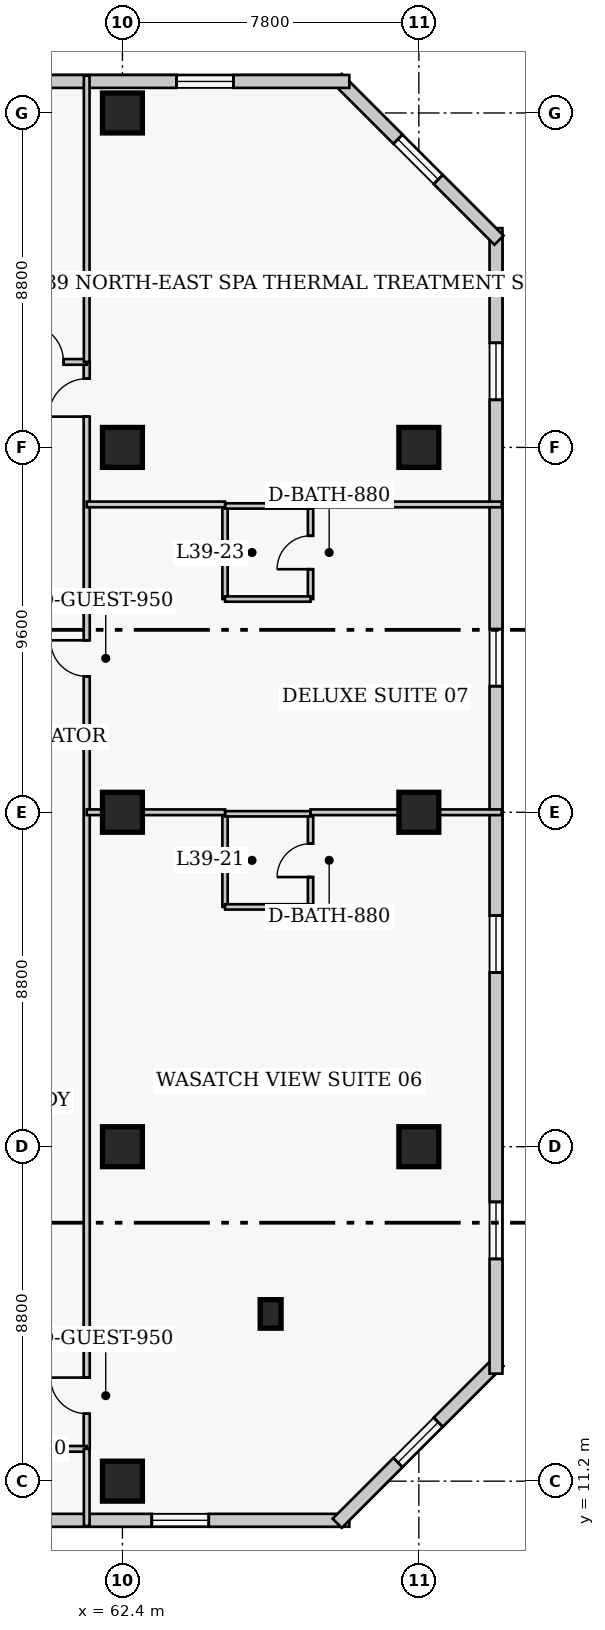
"""IFC4 building model, lengths in metres.
Left out: names, types, materials, properties, quantities, classifications, styles, units other than length and angle.
Written with IfcOpenShell. Run it as: python <this file> out.ifc"""

import sys

from ifc_helpers import new_model, si_unit, direction, frame, frame_2d, origin, origin_2d, place, context, subcontext, project, spatial, rectangle, extrude, element, fill, save


model = new_model("IFC4")
c1 = context("Model", 3, precision=1e-05, world=origin(), true_north=direction((0.0, 1.0)))
c2 = subcontext(c1, "Body", "Model", "MODEL_VIEW")
j1 = project(units=[si_unit("LENGTHUNIT", "METRE"), si_unit("PLANEANGLEUNIT", "RADIAN")], contexts=[c1])
p1 = place(None, origin())
s1 = spatial("IfcSite", under=j1, at=p1, CompositionType="ELEMENT")
p2 = place(p1, origin())
s2 = spatial("IfcBuilding", under=s1, at=p2, CompositionType="ELEMENT")
p3 = place(p2, frame((0.0, 0.0, 157.4)))
s3 = spatial("IfcBuildingStorey", under=s2, at=p3, CompositionType="ELEMENT", Elevation=157.4)
for number, where, z_axis, x_axis in (
    (1, (62.4, 11.2, 0.0), (0.0, 0.0, 1.0), (1.0, 0.0, 0.0)),
    (2, (62.4, 20.0, 0.0), (0.0, 0.0, 1.0), (1.0, 0.0, 0.0)),
    (3, (62.4, 28.8, 0.0), (0.0, 0.0, 1.0), (1.0, 0.0, 0.0)),
    (4, (62.4, 38.4, 0.0), (0.0, 0.0, 1.0), (1.0, 0.0, 0.0)),
    (5, (62.4, 47.2, 0.0), (0.0, 0.0, 1.0), (1.0, 0.0, 0.0)),
    (6, (70.2, 20.0, 0.0), (0.0, 0.0, 1.0), (1.0, 0.0, 0.0)),
    (7, (70.2, 28.8, 0.0), (0.0, 0.0, 1.0), (1.0, 0.0, 0.0)),
    (8, (70.2, 38.4, 0.0), (0.0, 0.0, 1.0), (1.0, 0.0, 0.0)),
):
    element("IfcColumn", number, at=place(p3, frame(where, z_axis=z_axis, x_axis=x_axis)), inside=s3, PredefinedType="COLUMN", context=c2, shape_type="SweptSolid", body=[
        extrude(rectangle(XDim=1.05, YDim=1.05, at=origin_2d()), origin(), (0.0, 0.0, 1.0), 3.8),
    ])
p4 = place(p3, frame((66.3, 15.6, 0.0), z_axis=(0.0, 0.0, 1.0), x_axis=(1.0, 0.0, 0.0)))
e9 = element("IfcColumn", 9, at=p4, inside=s3, PredefinedType="PILASTER", context=c2, shape_type="SweptSolid", body=[
    extrude(rectangle(XDim=0.55, YDim=0.75, at=origin_2d()), origin(), (0.0, 0.0, 1.0), 3.8),
])
p5 = place(p3, frame((41.68, 10.17, 0.0), z_axis=(0.0, 0.0, 1.0), x_axis=(1.0, 0.0, 0.0)))
e10 = element("IfcWall", 10, at=p5, inside=s3, PredefinedType="SOLIDWALL", context=c2, shape_type="SweptSolid", body=[
    extrude(rectangle(XDim=26.69, YDim=0.34, at=frame_2d((13.345, 0.0))), origin(), (0.0, 0.0, 1.0), 3.55),
])
p6 = place(p5, frame((8.32, 0.0, 0.0)))
e11 = element("IfcOpeningElement", 11, at=p6, cuts=e10, PredefinedType="OPENING", context=c2, shape_type="SweptSolid", body=[
    extrude(rectangle(XDim=1.4, YDim=2.15, at=frame_2d((0.7, 1.075))), frame((0.0, 0.18, 0.0), z_axis=(0.0, -1.0, 0.0), x_axis=(1.0, 0.0, 0.0)), (0.0, 0.0, 1.0), 0.36),
])
p7 = place(p5, frame((2.548, 0.0, 0.85)))
e12 = element("IfcOpeningElement", 12, at=p7, cuts=e10, PredefinedType="OPENING", context=c2, shape_type="SweptSolid", body=[
    extrude(rectangle(XDim=1.5, YDim=1.75, at=frame_2d((0.75, 0.875))), frame((0.0, 0.18, 0.0), z_axis=(0.0, -1.0, 0.0), x_axis=(1.0, 0.0, 0.0)), (0.0, 0.0, 1.0), 0.36),
])
p8 = place(p5, frame((13.745, 0.0, 0.85)))
e13 = element("IfcOpeningElement", 13, at=p8, cuts=e10, PredefinedType="OPENING", context=c2, shape_type="SweptSolid", body=[
    extrude(rectangle(XDim=1.5, YDim=1.75, at=frame_2d((0.75, 0.875))), frame((0.0, 0.18, 0.0), z_axis=(0.0, -1.0, 0.0), x_axis=(1.0, 0.0, 0.0)), (0.0, 0.0, 1.0), 0.36),
])
p9 = place(p5, frame((21.492, 0.0, 0.85)))
e14 = element("IfcOpeningElement", 14, at=p9, cuts=e10, PredefinedType="OPENING", context=c2, shape_type="SweptSolid", body=[
    extrude(rectangle(XDim=1.5, YDim=1.75, at=frame_2d((0.75, 0.875))), frame((0.0, 0.18, 0.0), z_axis=(0.0, -1.0, 0.0), x_axis=(1.0, 0.0, 0.0)), (0.0, 0.0, 1.0), 0.36),
])
p10 = place(p3, frame((68.052, 10.092, 0.0), z_axis=(0.0, 0.0, 1.0), x_axis=(0.707106781187, 0.707106781187, 0.0)))
e15 = element("IfcWall", 15, at=p10, inside=s3, PredefinedType="SOLIDWALL", context=c2, shape_type="SweptSolid", body=[
    extrude(rectangle(XDim=6.02, YDim=0.34, at=frame_2d((3.01, 0.0))), origin(), (0.0, 0.0, 1.0), 3.55),
])
p11 = place(p10, frame((2.26, 0.0, 0.85)))
e16 = element("IfcOpeningElement", 16, at=p11, cuts=e15, PredefinedType="OPENING", context=c2, shape_type="SweptSolid", body=[
    extrude(rectangle(XDim=1.5, YDim=1.75, at=frame_2d((0.75, 0.875))), frame((0.0, 0.18, 0.0), z_axis=(0.0, -1.0, 0.0), x_axis=(1.0, 0.0, 0.0)), (0.0, 0.0, 1.0), 0.36),
])
p12 = place(p3, frame((72.23, 14.03, 0.0), z_axis=(0.0, 0.0, 1.0), x_axis=(0.0, 1.0, 0.0)))
e17 = element("IfcWall", 17, at=p12, inside=s3, PredefinedType="SOLIDWALL", context=c2, shape_type="SweptSolid", body=[
    extrude(rectangle(XDim=30.14, YDim=0.34, at=frame_2d((15.07, 0.0))), origin(), (0.0, 0.0, 1.0), 3.55),
])
p13 = place(p12, frame((3.018, 0.0, 0.85)))
e18 = element("IfcOpeningElement", 18, at=p13, cuts=e17, PredefinedType="OPENING", context=c2, shape_type="SweptSolid", body=[
    extrude(rectangle(XDim=1.5, YDim=1.75, at=frame_2d((0.75, 0.875))), frame((0.0, 0.18, 0.0), z_axis=(0.0, -1.0, 0.0), x_axis=(1.0, 0.0, 0.0)), (0.0, 0.0, 1.0), 0.36),
])
p14 = place(p12, frame((10.552, 0.0, 0.85)))
e19 = element("IfcOpeningElement", 19, at=p14, cuts=e17, PredefinedType="OPENING", context=c2, shape_type="SweptSolid", body=[
    extrude(rectangle(XDim=1.5, YDim=1.75, at=frame_2d((0.75, 0.875))), frame((0.0, 0.18, 0.0), z_axis=(0.0, -1.0, 0.0), x_axis=(1.0, 0.0, 0.0)), (0.0, 0.0, 1.0), 0.36),
])
p15 = place(p12, frame((18.087, 0.0, 0.85)))
e20 = element("IfcOpeningElement", 20, at=p15, cuts=e17, PredefinedType="OPENING", context=c2, shape_type="SweptSolid", body=[
    extrude(rectangle(XDim=1.5, YDim=1.75, at=frame_2d((0.75, 0.875))), frame((0.0, 0.18, 0.0), z_axis=(0.0, -1.0, 0.0), x_axis=(1.0, 0.0, 0.0)), (0.0, 0.0, 1.0), 0.36),
])
p16 = place(p12, frame((25.623, 0.0, 0.85)))
e21 = element("IfcOpeningElement", 21, at=p16, cuts=e17, PredefinedType="OPENING", context=c2, shape_type="SweptSolid", body=[
    extrude(rectangle(XDim=1.5, YDim=1.75, at=frame_2d((0.75, 0.875))), frame((0.0, 0.18, 0.0), z_axis=(0.0, -1.0, 0.0), x_axis=(1.0, 0.0, 0.0)), (0.0, 0.0, 1.0), 0.36),
])
p17 = place(p3, frame((72.308, 43.852, 0.0), z_axis=(0.0, 0.0, 1.0), x_axis=(-0.707106781187, 0.707106781187, 0.0)))
e22 = element("IfcWall", 22, at=p17, inside=s3, PredefinedType="SOLIDWALL", context=c2, shape_type="SweptSolid", body=[
    extrude(rectangle(XDim=6.02, YDim=0.34, at=frame_2d((3.01, 0.0))), origin(), (0.0, 0.0, 1.0), 3.55),
])
p18 = place(p17, frame((2.26, 0.0, 0.85)))
e23 = element("IfcOpeningElement", 23, at=p18, cuts=e22, PredefinedType="OPENING", context=c2, shape_type="SweptSolid", body=[
    extrude(rectangle(XDim=1.5, YDim=1.75, at=frame_2d((0.75, 0.875))), frame((0.0, 0.18, 0.0), z_axis=(0.0, -1.0, 0.0), x_axis=(1.0, 0.0, 0.0)), (0.0, 0.0, 1.0), 0.36),
])
p19 = place(p3, frame((68.37, 48.03, 0.0), z_axis=(0.0, 0.0, 1.0), x_axis=(-1.0, 0.0, 0.0)))
e24 = element("IfcWall", 24, at=p19, inside=s3, PredefinedType="SOLIDWALL", context=c2, shape_type="SweptSolid", body=[
    extrude(rectangle(XDim=26.69, YDim=0.34, at=frame_2d((13.345, 0.0))), origin(), (0.0, 0.0, 1.0), 3.55),
])
p20 = place(p19, frame((3.048, 0.0, 0.85)))
e25 = element("IfcOpeningElement", 25, at=p20, cuts=e24, PredefinedType="OPENING", context=c2, shape_type="SweptSolid", body=[
    extrude(rectangle(XDim=1.5, YDim=1.75, at=frame_2d((0.75, 0.875))), frame((0.0, 0.18, 0.0), z_axis=(0.0, -1.0, 0.0), x_axis=(1.0, 0.0, 0.0)), (0.0, 0.0, 1.0), 0.36),
])
p21 = place(p19, frame((11.445, 0.0, 0.85)))
e26 = element("IfcOpeningElement", 26, at=p21, cuts=e24, PredefinedType="OPENING", context=c2, shape_type="SweptSolid", body=[
    extrude(rectangle(XDim=1.5, YDim=1.75, at=frame_2d((0.75, 0.875))), frame((0.0, 0.18, 0.0), z_axis=(0.0, -1.0, 0.0), x_axis=(1.0, 0.0, 0.0)), (0.0, 0.0, 1.0), 0.36),
])
p22 = place(p19, frame((22.642, 0.0, 0.85)))
e27 = element("IfcOpeningElement", 27, at=p22, cuts=e24, PredefinedType="OPENING", context=c2, shape_type="SweptSolid", body=[
    extrude(rectangle(XDim=1.5, YDim=1.75, at=frame_2d((0.75, 0.875))), frame((0.0, 0.18, 0.0), z_axis=(0.0, -1.0, 0.0), x_axis=(1.0, 0.0, 0.0)), (0.0, 0.0, 1.0), 0.36),
])
p23 = place(p3, frame((61.46, 12.05, 0.0), z_axis=(0.0, 0.0, 1.0), x_axis=(0.0, 1.0, 0.0)))
e28 = element("IfcWall", 28, at=p23, inside=s3, PredefinedType="PARTITIONING", context=c2, shape_type="SweptSolid", body=[
    extrude(rectangle(XDim=28.6, YDim=0.16, at=frame_2d((14.3, 0.0))), origin(), (0.0, 0.0, 1.0), 3.55),
])
p24 = place(p23, frame((0.925, 0.0, 0.0)))
e29 = element("IfcOpeningElement", 29, at=p24, cuts=e28, PredefinedType="OPENING", context=c2, shape_type="SweptSolid", body=[
    extrude(rectangle(XDim=0.95, YDim=2.1, at=frame_2d((0.475, 1.05))), frame((0.0, 0.09, 0.0), z_axis=(0.0, -1.0, 0.0), x_axis=(1.0, 0.0, 0.0)), (0.0, 0.0, 1.0), 0.18),
])
p25 = place(p23, frame((20.325, 0.0, 0.0)))
e30 = element("IfcOpeningElement", 30, at=p25, cuts=e28, PredefinedType="OPENING", context=c2, shape_type="SweptSolid", body=[
    extrude(rectangle(XDim=0.95, YDim=2.1, at=frame_2d((0.475, 1.05))), frame((0.0, 0.09, 0.0), z_axis=(0.0, -1.0, 0.0), x_axis=(1.0, 0.0, 0.0)), (0.0, 0.0, 1.0), 0.18),
])
p26 = place(p23, frame((27.16, 0.0, 0.0)))
e31 = element("IfcOpeningElement", 31, at=p26, cuts=e28, PredefinedType="OPENING", context=c2, shape_type="SweptSolid", body=[
    extrude(rectangle(XDim=1.0, YDim=2.15, at=frame_2d((0.5, 1.075))), frame((0.0, 0.09, 0.0), z_axis=(0.0, -1.0, 0.0), x_axis=(1.0, 0.0, 0.0)), (0.0, 0.0, 1.0), 0.18),
])
p27 = place(p3, frame((59.24, 12.05, 0.0), z_axis=(0.0, 0.0, 1.0), x_axis=(1.0, 0.0, 0.0)))
e32 = element("IfcWall", 32, at=p27, inside=s3, PredefinedType="PARTITIONING", context=c2, shape_type="SweptSolid", body=[
    extrude(rectangle(XDim=2.22, YDim=0.15, at=frame_2d((1.11, 0.0))), origin(), (0.0, 0.0, 1.0), 3.55),
])
p28 = place(p3, frame((56.8, 40.65, 0.0), z_axis=(0.0, 0.0, 1.0), x_axis=(1.0, 0.0, 0.0)))
e33 = element("IfcWall", 33, at=p28, inside=s3, PredefinedType="PARTITIONING", context=c2, shape_type="SweptSolid", body=[
    extrude(rectangle(XDim=4.66, YDim=0.15, at=frame_2d((2.33, 0.0))), origin(), (0.0, 0.0, 1.0), 3.55),
])
p29 = place(p28, frame((3.05, 0.0, 0.0)))
e34 = element("IfcOpeningElement", 34, at=p29, cuts=e33, PredefinedType="OPENING", context=c2, shape_type="SweptSolid", body=[
    extrude(rectangle(XDim=1.0, YDim=2.15, at=frame_2d((0.5, 1.075))), frame((0.0, 0.085, 0.0), z_axis=(0.0, -1.0, 0.0), x_axis=(1.0, 0.0, 0.0)), (0.0, 0.0, 1.0), 0.17),
])
p30 = place(p3, frame((61.46, 40.65, 0.0), z_axis=(0.0, 0.0, 1.0), x_axis=(0.0, 1.0, 0.0)))
e35 = element("IfcWall", 35, at=p30, inside=s3, PredefinedType="PARTITIONING", context=c2, shape_type="SweptSolid", body=[
    extrude(rectangle(XDim=7.53, YDim=0.15, at=frame_2d((3.765, 0.0))), origin(), (0.0, 0.0, 1.0), 3.55),
])
p31 = place(p3, frame((61.46, 10.02, 0.0), z_axis=(0.0, 0.0, 1.0), x_axis=(0.0, 1.0, 0.0)))
e36 = element("IfcWall", 36, at=p31, inside=s3, PredefinedType="PARTITIONING", context=c2, shape_type="SweptSolid", body=[
    extrude(rectangle(XDim=2.03, YDim=0.15, at=frame_2d((1.015, 0.0))), origin(), (0.0, 0.0, 1.0), 3.55),
])
p32 = place(p3, frame((65.1, 26.31, 0.0), z_axis=(0.0, 0.0, 1.0), x_axis=(0.0, 1.0, 0.0)))
e37 = element("IfcWall", 37, at=p32, inside=s3, PredefinedType="PLUMBINGWALL", context=c2, shape_type="SweptSolid", body=[
    extrude(rectangle(XDim=2.45, YDim=0.14, at=frame_2d((1.225, 0.0))), origin(), (0.0, 0.0, 1.0), 3.55),
])
p33 = place(p3, frame((67.35, 26.31, 0.0), z_axis=(0.0, 0.0, 1.0), x_axis=(0.0, 1.0, 0.0)))
e38 = element("IfcWall", 38, at=p33, inside=s3, PredefinedType="PLUMBINGWALL", context=c2, shape_type="SweptSolid", body=[
    extrude(rectangle(XDim=2.45, YDim=0.14, at=frame_2d((1.225, 0.0))), origin(), (0.0, 0.0, 1.0), 3.55),
])
p34 = place(p33, frame((0.785, 0.0, 0.0)))
e39 = element("IfcOpeningElement", 39, at=p34, cuts=e38, PredefinedType="OPENING", context=c2, shape_type="SweptSolid", body=[
    extrude(rectangle(XDim=0.88, YDim=2.05, at=frame_2d((0.44, 1.025))), frame((0.0, 0.08, 0.0), z_axis=(0.0, -1.0, 0.0), x_axis=(1.0, 0.0, 0.0)), (0.0, 0.0, 1.0), 0.16),
])
p35 = place(p3, frame((65.1, 26.31, 0.0), z_axis=(0.0, 0.0, 1.0), x_axis=(1.0, 0.0, 0.0)))
e40 = element("IfcWall", 40, at=p35, inside=s3, PredefinedType="PLUMBINGWALL", context=c2, shape_type="SweptSolid", body=[
    extrude(rectangle(XDim=2.25, YDim=0.14, at=frame_2d((1.125, 0.0))), origin(), (0.0, 0.0, 1.0), 3.55),
])
p36 = place(p3, frame((65.1, 28.76, 0.0), z_axis=(0.0, 0.0, 1.0), x_axis=(1.0, 0.0, 0.0)))
e41 = element("IfcWall", 41, at=p36, inside=s3, PredefinedType="PLUMBINGWALL", context=c2, shape_type="SweptSolid", body=[
    extrude(rectangle(XDim=2.25, YDim=0.14, at=frame_2d((1.125, 0.0))), origin(), (0.0, 0.0, 1.0), 2.9),
])
p37 = place(p3, frame((61.46, 28.8, 0.0), z_axis=(0.0, 0.0, 1.0), x_axis=(1.0, 0.0, 0.0)))
e42 = element("IfcWall", 42, at=p37, inside=s3, PredefinedType="PARTITIONING", context=c2, shape_type="SweptSolid", body=[
    extrude(rectangle(XDim=3.64, YDim=0.15, at=frame_2d((1.82, 0.0))), origin(), (0.0, 0.0, 1.0), 2.778),
])
p38 = place(p3, frame((67.35, 28.8, 0.0), z_axis=(0.0, 0.0, 1.0), x_axis=(1.0, 0.0, 0.0)))
e43 = element("IfcWall", 43, at=p38, inside=s3, PredefinedType="PARTITIONING", context=c2, shape_type="SweptSolid", body=[
    extrude(rectangle(XDim=5.03, YDim=0.15, at=frame_2d((2.515, 0.0))), origin(), (0.0, 0.0, 1.0), 2.778),
])
p39 = place(p3, frame((65.1, 34.41, 0.0), z_axis=(0.0, 0.0, 1.0), x_axis=(0.0, 1.0, 0.0)))
e44 = element("IfcWall", 44, at=p39, inside=s3, PredefinedType="PLUMBINGWALL", context=c2, shape_type="SweptSolid", body=[
    extrude(rectangle(XDim=2.45, YDim=0.14, at=frame_2d((1.225, 0.0))), origin(), (0.0, 0.0, 1.0), 3.55),
])
p40 = place(p3, frame((67.35, 34.41, 0.0), z_axis=(0.0, 0.0, 1.0), x_axis=(0.0, 1.0, 0.0)))
e45 = element("IfcWall", 45, at=p40, inside=s3, PredefinedType="PLUMBINGWALL", context=c2, shape_type="SweptSolid", body=[
    extrude(rectangle(XDim=2.45, YDim=0.14, at=frame_2d((1.225, 0.0))), origin(), (0.0, 0.0, 1.0), 3.55),
])
p41 = place(p40, frame((0.785, 0.0, 0.0)))
e46 = element("IfcOpeningElement", 46, at=p41, cuts=e45, PredefinedType="OPENING", context=c2, shape_type="SweptSolid", body=[
    extrude(rectangle(XDim=0.88, YDim=2.05, at=frame_2d((0.44, 1.025))), frame((0.0, 0.08, 0.0), z_axis=(0.0, -1.0, 0.0), x_axis=(1.0, 0.0, 0.0)), (0.0, 0.0, 1.0), 0.16),
])
for number, where, z_axis, x_axis in (
    (47, (65.1, 34.41, 0.0), (0.0, 0.0, 1.0), (1.0, 0.0, 0.0)),
    (48, (65.1, 36.86, 0.0), (0.0, 0.0, 1.0), (1.0, 0.0, 0.0)),
):
    element("IfcWall", number, at=place(p3, frame(where, z_axis=z_axis, x_axis=x_axis)), inside=s3, PredefinedType="PLUMBINGWALL", context=c2, shape_type="SweptSolid", body=[
        extrude(rectangle(XDim=2.25, YDim=0.14, at=frame_2d((1.125, 0.0))), origin(), (0.0, 0.0, 1.0), 3.55),
    ])
p42 = place(p3, frame((61.46, 36.9, 0.0), z_axis=(0.0, 0.0, 1.0), x_axis=(1.0, 0.0, 0.0)))
e49 = element("IfcWall", 49, at=p42, inside=s3, PredefinedType="PARTITIONING", context=c2, shape_type="SweptSolid", body=[
    extrude(rectangle(XDim=3.64, YDim=0.15, at=frame_2d((1.82, 0.0))), origin(), (0.0, 0.0, 1.0), 3.55),
])
p43 = place(p3, frame((67.35, 36.9, 0.0), z_axis=(0.0, 0.0, 1.0), x_axis=(1.0, 0.0, 0.0)))
e50 = element("IfcWall", 50, at=p43, inside=s3, PredefinedType="PARTITIONING", context=c2, shape_type="SweptSolid", body=[
    extrude(rectangle(XDim=5.03, YDim=0.15, at=frame_2d((2.515, 0.0))), origin(), (0.0, 0.0, 1.0), 3.55),
])
p44 = place(p9, origin())
e51 = element("IfcWindow", 51, at=p44, inside=s3, PartitioningType="SINGLE_PANEL", PredefinedType="WINDOW", context=c2, shape_type="SweptSolid", body=[
    extrude(rectangle(XDim=1.5, YDim=1.75, at=frame_2d((0.75, 0.875))), frame((0.0, 0.03, 0.0), z_axis=(0.0, -1.0, 0.0), x_axis=(1.0, 0.0, 0.0)), (0.0, 0.0, 1.0), 0.06),
])
fill(e14, e51)
p45 = place(p11, origin())
e52 = element("IfcWindow", 52, at=p45, inside=s3, PartitioningType="SINGLE_PANEL", PredefinedType="WINDOW", context=c2, shape_type="SweptSolid", body=[
    extrude(rectangle(XDim=1.5, YDim=1.75, at=frame_2d((0.75, 0.875))), frame((0.0, 0.03, 0.0), z_axis=(0.0, -1.0, 0.0), x_axis=(1.0, 0.0, 0.0)), (0.0, 0.0, 1.0), 0.06),
])
fill(e16, e52)
p46 = place(p13, origin())
e53 = element("IfcWindow", 53, at=p46, inside=s3, PartitioningType="SINGLE_PANEL", PredefinedType="WINDOW", context=c2, shape_type="SweptSolid", body=[
    extrude(rectangle(XDim=1.5, YDim=1.75, at=frame_2d((0.75, 0.875))), frame((0.0, 0.03, 0.0), z_axis=(0.0, -1.0, 0.0), x_axis=(1.0, 0.0, 0.0)), (0.0, 0.0, 1.0), 0.06),
])
fill(e18, e53)
p47 = place(p14, origin())
e54 = element("IfcWindow", 54, at=p47, inside=s3, PartitioningType="SINGLE_PANEL", PredefinedType="WINDOW", context=c2, shape_type="SweptSolid", body=[
    extrude(rectangle(XDim=1.5, YDim=1.75, at=frame_2d((0.75, 0.875))), frame((0.0, 0.03, 0.0), z_axis=(0.0, -1.0, 0.0), x_axis=(1.0, 0.0, 0.0)), (0.0, 0.0, 1.0), 0.06),
])
fill(e19, e54)
p48 = place(p15, origin())
e55 = element("IfcWindow", 55, at=p48, inside=s3, PartitioningType="SINGLE_PANEL", PredefinedType="WINDOW", context=c2, shape_type="SweptSolid", body=[
    extrude(rectangle(XDim=1.5, YDim=1.75, at=frame_2d((0.75, 0.875))), frame((0.0, 0.03, 0.0), z_axis=(0.0, -1.0, 0.0), x_axis=(1.0, 0.0, 0.0)), (0.0, 0.0, 1.0), 0.06),
])
fill(e20, e55)
p49 = place(p16, origin())
e56 = element("IfcWindow", 56, at=p49, inside=s3, PartitioningType="SINGLE_PANEL", PredefinedType="WINDOW", context=c2, shape_type="SweptSolid", body=[
    extrude(rectangle(XDim=1.5, YDim=1.75, at=frame_2d((0.75, 0.875))), frame((0.0, 0.03, 0.0), z_axis=(0.0, -1.0, 0.0), x_axis=(1.0, 0.0, 0.0)), (0.0, 0.0, 1.0), 0.06),
])
fill(e21, e56)
p50 = place(p18, origin())
e57 = element("IfcWindow", 57, at=p50, inside=s3, PartitioningType="SINGLE_PANEL", PredefinedType="WINDOW", context=c2, shape_type="SweptSolid", body=[
    extrude(rectangle(XDim=1.5, YDim=1.75, at=frame_2d((0.75, 0.875))), frame((0.0, 0.03, 0.0), z_axis=(0.0, -1.0, 0.0), x_axis=(1.0, 0.0, 0.0)), (0.0, 0.0, 1.0), 0.06),
])
fill(e23, e57)
p51 = place(p20, origin())
e58 = element("IfcWindow", 58, at=p51, inside=s3, PartitioningType="SINGLE_PANEL", PredefinedType="WINDOW", context=c2, shape_type="SweptSolid", body=[
    extrude(rectangle(XDim=1.5, YDim=1.75, at=frame_2d((0.75, 0.875))), frame((0.0, 0.03, 0.0), z_axis=(0.0, -1.0, 0.0), x_axis=(1.0, 0.0, 0.0)), (0.0, 0.0, 1.0), 0.06),
])
fill(e25, e58)
p52 = place(p29, origin())
e59 = element("IfcDoor", 59, at=p52, inside=s3, OperationType="SINGLE_SWING_LEFT", PredefinedType="DOOR", context=c2, shape_type="SweptSolid", body=[
    extrude(rectangle(XDim=1.0, YDim=2.15, at=frame_2d((0.5, 1.075))), frame((0.0, 0.025, 0.0), z_axis=(0.0, -1.0, 0.0), x_axis=(1.0, 0.0, 0.0)), (0.0, 0.0, 1.0), 0.05),
])
fill(e34, e59)
p53 = place(p34, origin())
e60 = element("IfcDoor", 60, at=p53, inside=s3, OperationType="SINGLE_SWING_LEFT", PredefinedType="DOOR", context=c2, shape_type="SweptSolid", body=[
    extrude(rectangle(XDim=0.88, YDim=2.05, at=frame_2d((0.44, 1.025))), frame((0.0, 0.025, 0.0), z_axis=(0.0, -1.0, 0.0), x_axis=(1.0, 0.0, 0.0)), (0.0, 0.0, 1.0), 0.05),
])
fill(e39, e60)
p54 = place(p24, origin())
e61 = element("IfcDoor", 61, at=p54, inside=s3, OperationType="SINGLE_SWING_RIGHT", PredefinedType="DOOR", context=c2, shape_type="SweptSolid", body=[
    extrude(rectangle(XDim=0.95, YDim=2.1, at=frame_2d((0.475, 1.05))), frame((0.0, 0.025, 0.0), z_axis=(0.0, -1.0, 0.0), x_axis=(1.0, 0.0, 0.0)), (0.0, 0.0, 1.0), 0.05),
])
fill(e29, e61)
p55 = place(p41, origin())
e62 = element("IfcDoor", 62, at=p55, inside=s3, OperationType="SINGLE_SWING_LEFT", PredefinedType="DOOR", context=c2, shape_type="SweptSolid", body=[
    extrude(rectangle(XDim=0.88, YDim=2.05, at=frame_2d((0.44, 1.025))), frame((0.0, 0.025, 0.0), z_axis=(0.0, -1.0, 0.0), x_axis=(1.0, 0.0, 0.0)), (0.0, 0.0, 1.0), 0.05),
])
fill(e46, e62)
p56 = place(p25, origin())
e63 = element("IfcDoor", 63, at=p56, inside=s3, OperationType="SINGLE_SWING_RIGHT", PredefinedType="DOOR", context=c2, shape_type="SweptSolid", body=[
    extrude(rectangle(XDim=0.95, YDim=2.1, at=frame_2d((0.475, 1.05))), frame((0.0, 0.025, 0.0), z_axis=(0.0, -1.0, 0.0), x_axis=(1.0, 0.0, 0.0)), (0.0, 0.0, 1.0), 0.05),
])
fill(e30, e63)
p57 = place(p26, origin())
e64 = element("IfcDoor", 64, at=p57, inside=s3, OperationType="SINGLE_SWING_LEFT", PredefinedType="DOOR", context=c2, shape_type="SweptSolid", body=[
    extrude(rectangle(XDim=1.0, YDim=2.15, at=frame_2d((0.5, 1.075))), frame((0.0, 0.025, 0.0), z_axis=(0.0, -1.0, 0.0), x_axis=(1.0, 0.0, 0.0)), (0.0, 0.0, 1.0), 0.05),
])
fill(e31, e64)
save(model, sys.argv[1])
